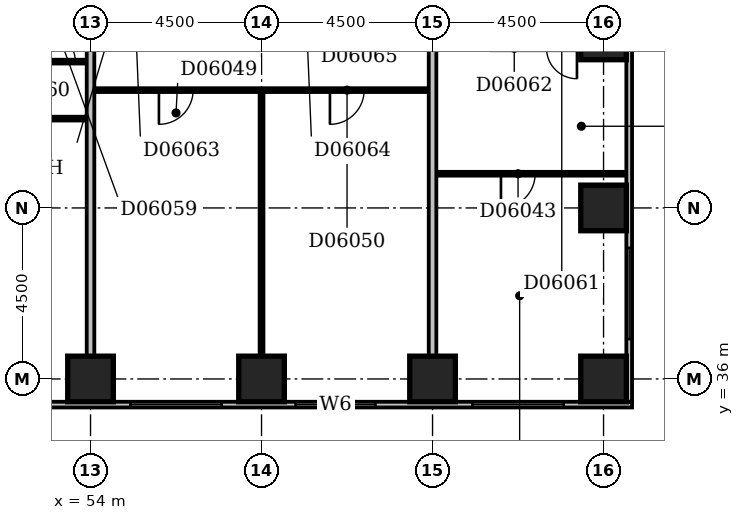
"""IFC4 building model, lengths in metres.
Left out: names, types, materials, properties, quantities, classifications, styles, units other than length and angle.
Written with IfcOpenShell. Run it as: python <this file> out.ifc"""

import sys

from ifc_helpers import new_model, si_unit, direction, frame, frame_2d, origin, origin_2d, place, context, subcontext, project, spatial, rectangle, extrude, element, fill, save


model = new_model("IFC4")
c1 = context("Model", 3, precision=1e-05, world=origin(), true_north=direction((0.0, 1.0)))
c2 = subcontext(c1, "Body", "Model", "MODEL_VIEW")
j1 = project(units=[si_unit("LENGTHUNIT", "METRE"), si_unit("PLANEANGLEUNIT", "RADIAN")], contexts=[c1])
p1 = place(None, origin())
s1 = spatial("IfcSite", under=j1, at=p1, CompositionType="ELEMENT")
p2 = place(p1, origin())
s2 = spatial("IfcBuilding", under=s1, at=p2, CompositionType="ELEMENT")
p3 = place(p2, frame((0.0, 0.0, 32.6)))
s3 = spatial("IfcBuildingStorey", under=s2, at=p3, CompositionType="ELEMENT", Elevation=32.6)
for number, where, z_axis, x_axis in (
    (1, (54.0, 36.0, -0.3), (0.0, 0.0, 1.0), (1.0, 0.0, 0.0)),
    (2, (58.5, 36.0, -0.3), (0.0, 0.0, 1.0), (1.0, 0.0, 0.0)),
    (3, (63.0, 36.0, -0.3), (0.0, 0.0, 1.0), (1.0, 0.0, 0.0)),
    (4, (67.5, 36.0, -0.3), (0.0, 0.0, 1.0), (1.0, 0.0, 0.0)),
    (5, (67.5, 40.5, -0.3), (0.0, 0.0, 1.0), (1.0, 0.0, 0.0)),
    (6, (67.5, 45.0, -0.3), (0.0, 0.0, 1.0), (1.0, 0.0, 0.0)),
):
    element("IfcColumn", number, at=place(p3, frame(where, z_axis=z_axis, x_axis=x_axis)), inside=s3, PredefinedType="COLUMN", context=c2, shape_type="SweptSolid", body=[
        extrude(rectangle(XDim=1.2, YDim=1.2, at=origin_2d()), origin(), (0.0, 0.0, 1.0), 3.6),
    ])
p4 = place(p3, frame((23.1, 35.325, 0.0), z_axis=(0.0, 0.0, 1.0), x_axis=(1.0, 0.0, 0.0)))
e7 = element("IfcWall", 7, at=p4, inside=s3, PredefinedType="STANDARD", context=c2, shape_type="SweptSolid", body=[
    extrude(rectangle(XDim=45.15, YDim=0.15, at=frame_2d((22.575, 0.0))), origin(), (0.0, 0.0, 1.0), 2.7),
])
p5 = place(p4, frame((0.45, 0.0, 0.6)))
e8 = element("IfcOpeningElement", 8, at=p5, cuts=e7, PredefinedType="OPENING", context=c2, shape_type="SweptSolid", body=[
    extrude(rectangle(XDim=2.4, YDim=1.8, at=frame_2d((1.2, 0.9))), frame((0.0, 0.087, 0.0), z_axis=(0.0, -1.0, 0.0), x_axis=(1.0, 0.0, 0.0)), (0.0, 0.0, 1.0), 0.174),
])
p6 = place(p4, frame((4.95, 0.0, 0.6)))
e9 = element("IfcOpeningElement", 9, at=p6, cuts=e7, PredefinedType="OPENING", context=c2, shape_type="SweptSolid", body=[
    extrude(rectangle(XDim=2.4, YDim=1.8, at=frame_2d((1.2, 0.9))), frame((0.0, 0.087, 0.0), z_axis=(0.0, -1.0, 0.0), x_axis=(1.0, 0.0, 0.0)), (0.0, 0.0, 1.0), 0.174),
])
p7 = place(p4, frame((10.583, 0.0, 0.6)))
e10 = element("IfcOpeningElement", 10, at=p7, cuts=e7, PredefinedType="OPENING", context=c2, shape_type="SweptSolid", body=[
    extrude(rectangle(XDim=1.5, YDim=1.8, at=frame_2d((0.75, 0.9))), frame((0.0, 0.087, 0.0), z_axis=(0.0, -1.0, 0.0), x_axis=(1.0, 0.0, 0.0)), (0.0, 0.0, 1.0), 0.174),
])
p8 = place(p4, frame((13.83, 0.0, 0.6)))
e11 = element("IfcOpeningElement", 11, at=p8, cuts=e7, PredefinedType="OPENING", context=c2, shape_type="SweptSolid", body=[
    extrude(rectangle(XDim=1.5, YDim=1.8, at=frame_2d((0.75, 0.9))), frame((0.0, 0.087, 0.0), z_axis=(0.0, -1.0, 0.0), x_axis=(1.0, 0.0, 0.0)), (0.0, 0.0, 1.0), 0.174),
])
p9 = place(p4, frame((18.45, 0.0, 0.6)))
e12 = element("IfcOpeningElement", 12, at=p9, cuts=e7, PredefinedType="OPENING", context=c2, shape_type="SweptSolid", body=[
    extrude(rectangle(XDim=2.4, YDim=1.8, at=frame_2d((1.2, 0.9))), frame((0.0, 0.087, 0.0), z_axis=(0.0, -1.0, 0.0), x_axis=(1.0, 0.0, 0.0)), (0.0, 0.0, 1.0), 0.174),
])
p10 = place(p4, frame((22.95, 0.0, 0.6)))
e13 = element("IfcOpeningElement", 13, at=p10, cuts=e7, PredefinedType="OPENING", context=c2, shape_type="SweptSolid", body=[
    extrude(rectangle(XDim=2.4, YDim=1.8, at=frame_2d((1.2, 0.9))), frame((0.0, 0.087, 0.0), z_axis=(0.0, -1.0, 0.0), x_axis=(1.0, 0.0, 0.0)), (0.0, 0.0, 1.0), 0.174),
])
p11 = place(p4, frame((27.45, 0.0, 0.6)))
e14 = element("IfcOpeningElement", 14, at=p11, cuts=e7, PredefinedType="OPENING", context=c2, shape_type="SweptSolid", body=[
    extrude(rectangle(XDim=2.4, YDim=1.8, at=frame_2d((1.2, 0.9))), frame((0.0, 0.087, 0.0), z_axis=(0.0, -1.0, 0.0), x_axis=(1.0, 0.0, 0.0)), (0.0, 0.0, 1.0), 0.174),
])
p12 = place(p4, frame((31.95, 0.0, 0.6)))
e15 = element("IfcOpeningElement", 15, at=p12, cuts=e7, PredefinedType="OPENING", context=c2, shape_type="SweptSolid", body=[
    extrude(rectangle(XDim=2.4, YDim=1.8, at=frame_2d((1.2, 0.9))), frame((0.0, 0.087, 0.0), z_axis=(0.0, -1.0, 0.0), x_axis=(1.0, 0.0, 0.0)), (0.0, 0.0, 1.0), 0.174),
])
p13 = place(p4, frame((36.297, 0.0, 0.6)))
e16 = element("IfcOpeningElement", 16, at=p13, cuts=e7, PredefinedType="OPENING", context=c2, shape_type="SweptSolid", body=[
    extrude(rectangle(XDim=2.1, YDim=1.8, at=frame_2d((1.05, 0.9))), frame((0.0, 0.087, 0.0), z_axis=(0.0, -1.0, 0.0), x_axis=(1.0, 0.0, 0.0)), (0.0, 0.0, 1.0), 0.174),
])
p14 = place(p4, frame((40.95, 0.0, 0.6)))
e17 = element("IfcOpeningElement", 17, at=p14, cuts=e7, PredefinedType="OPENING", context=c2, shape_type="SweptSolid", body=[
    extrude(rectangle(XDim=2.4, YDim=1.8, at=frame_2d((1.2, 0.9))), frame((0.0, 0.087, 0.0), z_axis=(0.0, -1.0, 0.0), x_axis=(1.0, 0.0, 0.0)), (0.0, 0.0, 1.0), 0.174),
])
p15 = place(p3, frame((68.175, 35.4, 0.0), z_axis=(0.0, 0.0, 1.0), x_axis=(0.0, 1.0, 0.0)))
e18 = element("IfcWall", 18, at=p15, inside=s3, PredefinedType="STANDARD", context=c2, shape_type="SweptSolid", body=[
    extrude(rectangle(XDim=23.85, YDim=0.15, at=frame_2d((11.925, 0.0))), origin(), (0.0, 0.0, 1.0), 2.7),
])
p16 = place(p15, frame((1.65, 0.0, 0.6)))
e19 = element("IfcOpeningElement", 19, at=p16, cuts=e18, PredefinedType="OPENING", context=c2, shape_type="SweptSolid", body=[
    extrude(rectangle(XDim=2.4, YDim=1.8, at=frame_2d((1.2, 0.9))), frame((0.0, 0.087, 0.0), z_axis=(0.0, -1.0, 0.0), x_axis=(1.0, 0.0, 0.0)), (0.0, 0.0, 1.0), 0.174),
])
p17 = place(p15, frame((19.65, 0.0, 0.6)))
e20 = element("IfcOpeningElement", 20, at=p17, cuts=e18, PredefinedType="OPENING", context=c2, shape_type="SweptSolid", body=[
    extrude(rectangle(XDim=2.4, YDim=1.8, at=frame_2d((1.2, 0.9))), frame((0.0, 0.087, 0.0), z_axis=(0.0, -1.0, 0.0), x_axis=(1.0, 0.0, 0.0)), (0.0, 0.0, 1.0), 0.174),
])
p18 = place(p3, frame((54.0, 36.6, 0.0), z_axis=(0.0, 0.0, 1.0), x_axis=(0.0, 1.0, 0.0)))
e21 = element("IfcWall", 21, at=p18, inside=s3, PredefinedType="PARTITIONING", context=c2, shape_type="SweptSolid", body=[
    extrude(rectangle(XDim=12.8, YDim=0.2, at=frame_2d((6.4, 0.0))), origin(), (0.0, 0.0, 1.0), 2.6),
])
p19 = place(p3, frame((58.5, 36.6, 0.0), z_axis=(0.0, 0.0, 1.0), x_axis=(0.0, 1.0, 0.0)))
e22 = element("IfcWall", 22, at=p19, inside=s3, PredefinedType="PARTITIONING", context=c2, shape_type="SweptSolid", body=[
    extrude(rectangle(XDim=6.95, YDim=0.1, at=frame_2d((3.475, 0.0))), origin(), (0.0, 0.0, 1.0), 3.3),
])
p20 = place(p3, frame((63.0, 36.6, 0.0), z_axis=(0.0, 0.0, 1.0), x_axis=(0.0, 1.0, 0.0)))
e23 = element("IfcWall", 23, at=p20, inside=s3, PredefinedType="PARTITIONING", context=c2, shape_type="SweptSolid", body=[
    extrude(rectangle(XDim=12.8, YDim=0.2, at=frame_2d((6.4, 0.0))), origin(), (0.0, 0.0, 1.0), 2.4),
])
p21 = place(p3, frame((63.1, 41.4, 0.0), z_axis=(0.0, 0.0, 1.0), x_axis=(1.0, 0.0, 0.0)))
e24 = element("IfcWall", 24, at=p21, inside=s3, PredefinedType="PARTITIONING", context=c2, shape_type="SweptSolid", body=[
    extrude(rectangle(XDim=5.0, YDim=0.1, at=frame_2d((2.5, 0.0))), origin(), (0.0, 0.0, 1.0), 3.3),
])
p22 = place(p21, frame((1.7, 0.0, 0.0)))
e25 = element("IfcOpeningElement", 25, at=p22, cuts=e24, PredefinedType="OPENING", context=c2, shape_type="SweptSolid", body=[
    extrude(rectangle(XDim=0.9, YDim=2.1, at=frame_2d((0.45, 1.05))), frame((0.0, 0.062, 0.0), z_axis=(0.0, -1.0, 0.0), x_axis=(1.0, 0.0, 0.0)), (0.0, 0.0, 1.0), 0.124),
])
p23 = place(p3, frame((40.6, 42.85, 0.0), z_axis=(0.0, 0.0, 1.0), x_axis=(1.0, 0.0, 0.0)))
e26 = element("IfcWall", 26, at=p23, inside=s3, PredefinedType="PARTITIONING", context=c2, shape_type="SweptSolid", body=[
    extrude(rectangle(XDim=13.3, YDim=0.1, at=frame_2d((6.65, 0.0))), origin(), (0.0, 0.0, 1.0), 3.3),
])
p24 = place(p23, frame((3.9, 0.0, 0.0)))
e27 = element("IfcOpeningElement", 27, at=p24, cuts=e26, PredefinedType="OPENING", context=c2, shape_type="SweptSolid", body=[
    extrude(rectangle(XDim=0.9, YDim=2.1, at=frame_2d((0.45, 1.05))), frame((0.0, 0.062, 0.0), z_axis=(0.0, -1.0, 0.0), x_axis=(1.0, 0.0, 0.0)), (0.0, 0.0, 1.0), 0.124),
])
p25 = place(p23, frame((10.7, 0.0, 0.0)))
e28 = element("IfcOpeningElement", 28, at=p25, cuts=e26, PredefinedType="OPENING", context=c2, shape_type="SweptSolid", body=[
    extrude(rectangle(XDim=0.9, YDim=2.1, at=frame_2d((0.45, 1.05))), frame((0.0, 0.062, 0.0), z_axis=(0.0, -1.0, 0.0), x_axis=(1.0, 0.0, 0.0)), (0.0, 0.0, 1.0), 0.124),
])
p26 = place(p3, frame((54.1, 43.6, 0.0), z_axis=(0.0, 0.0, 1.0), x_axis=(1.0, 0.0, 0.0)))
e29 = element("IfcWall", 29, at=p26, inside=s3, PredefinedType="PARTITIONING", context=c2, shape_type="SweptSolid", body=[
    extrude(rectangle(XDim=8.8, YDim=0.1, at=frame_2d((4.4, 0.0))), origin(), (0.0, 0.0, 1.0), 3.3),
])
p27 = place(p26, frame((1.7, 0.0, 0.0)))
e30 = element("IfcOpeningElement", 30, at=p27, cuts=e29, PredefinedType="OPENING", context=c2, shape_type="SweptSolid", body=[
    extrude(rectangle(XDim=0.9, YDim=2.1, at=frame_2d((0.45, 1.05))), frame((0.0, 0.062, 0.0), z_axis=(0.0, -1.0, 0.0), x_axis=(1.0, 0.0, 0.0)), (0.0, 0.0, 1.0), 0.124),
])
p28 = place(p26, frame((6.2, 0.0, 0.0)))
e31 = element("IfcOpeningElement", 31, at=p28, cuts=e29, PredefinedType="OPENING", context=c2, shape_type="SweptSolid", body=[
    extrude(rectangle(XDim=0.9, YDim=2.1, at=frame_2d((0.45, 1.05))), frame((0.0, 0.062, 0.0), z_axis=(0.0, -1.0, 0.0), x_axis=(1.0, 0.0, 0.0)), (0.0, 0.0, 1.0), 0.124),
])
p29 = place(p3, frame((42.15, 44.35, 0.0), z_axis=(0.0, 0.0, 1.0), x_axis=(1.0, 0.0, 0.0)))
e32 = element("IfcWall", 32, at=p29, inside=s3, PredefinedType="PARTITIONING", context=c2, shape_type="SweptSolid", body=[
    extrude(rectangle(XDim=11.75, YDim=0.1, at=frame_2d((5.875, 0.0))), origin(), (0.0, 0.0, 1.0), 3.3),
])
p30 = place(p29, frame((7.15, 0.0, 0.0)))
e33 = element("IfcOpeningElement", 33, at=p30, cuts=e32, PredefinedType="OPENING", context=c2, shape_type="SweptSolid", body=[
    extrude(rectangle(XDim=0.8, YDim=2.1, at=frame_2d((0.4, 1.05))), frame((0.0, 0.062, 0.0), z_axis=(0.0, -1.0, 0.0), x_axis=(1.0, 0.0, 0.0)), (0.0, 0.0, 1.0), 0.124),
])
p31 = place(p29, frame((2.7, 0.0, 0.0)))
e34 = element("IfcOpeningElement", 34, at=p31, cuts=e32, PredefinedType="OPENING", context=c2, shape_type="SweptSolid", body=[
    extrude(rectangle(XDim=0.9, YDim=2.1, at=frame_2d((0.45, 1.05))), frame((0.0, 0.062, 0.0), z_axis=(0.0, -1.0, 0.0), x_axis=(1.0, 0.0, 0.0)), (0.0, 0.0, 1.0), 0.124),
])
p32 = place(p29, frame((10.65, 0.0, 0.0)))
e35 = element("IfcOpeningElement", 35, at=p32, cuts=e32, PredefinedType="OPENING", context=c2, shape_type="SweptSolid", body=[
    extrude(rectangle(XDim=0.8, YDim=2.1, at=frame_2d((0.4, 1.05))), frame((0.0, 0.062, 0.0), z_axis=(0.0, -1.0, 0.0), x_axis=(1.0, 0.0, 0.0)), (0.0, 0.0, 1.0), 0.124),
])
p33 = place(p29, frame((9.1, 0.0, 0.0)))
e36 = element("IfcOpeningElement", 36, at=p33, cuts=e32, PredefinedType="OPENING", context=c2, shape_type="SweptSolid", body=[
    extrude(rectangle(XDim=0.8, YDim=2.1, at=frame_2d((0.4, 1.05))), frame((0.0, 0.062, 0.0), z_axis=(0.0, -1.0, 0.0), x_axis=(1.0, 0.0, 0.0)), (0.0, 0.0, 1.0), 0.124),
])
p34 = place(p12, origin())
e37 = element("IfcWindow", 37, at=p34, inside=s3, PartitioningType="SINGLE_PANEL", PredefinedType="WINDOW", context=c2, shape_type="SweptSolid", body=[
    extrude(rectangle(XDim=2.4, YDim=1.8, at=frame_2d((1.2, 0.9))), frame((0.0, 0.03, 0.0), z_axis=(0.0, -1.0, 0.0), x_axis=(1.0, 0.0, 0.0)), (0.0, 0.0, 1.0), 0.06),
])
fill(e15, e37)
p35 = place(p13, origin())
e38 = element("IfcWindow", 38, at=p35, inside=s3, PartitioningType="SINGLE_PANEL", PredefinedType="WINDOW", context=c2, shape_type="SweptSolid", body=[
    extrude(rectangle(XDim=2.1, YDim=1.8, at=frame_2d((1.05, 0.9))), frame((0.0, 0.03, 0.0), z_axis=(0.0, -1.0, 0.0), x_axis=(1.0, 0.0, 0.0)), (0.0, 0.0, 1.0), 0.06),
])
fill(e16, e38)
p36 = place(p14, origin())
e39 = element("IfcWindow", 39, at=p36, inside=s3, PartitioningType="SINGLE_PANEL", PredefinedType="WINDOW", context=c2, shape_type="SweptSolid", body=[
    extrude(rectangle(XDim=2.4, YDim=1.8, at=frame_2d((1.2, 0.9))), frame((0.0, 0.03, 0.0), z_axis=(0.0, -1.0, 0.0), x_axis=(1.0, 0.0, 0.0)), (0.0, 0.0, 1.0), 0.06),
])
fill(e17, e39)
p37 = place(p16, origin())
e40 = element("IfcWindow", 40, at=p37, inside=s3, PartitioningType="SINGLE_PANEL", PredefinedType="WINDOW", context=c2, shape_type="SweptSolid", body=[
    extrude(rectangle(XDim=2.4, YDim=1.8, at=frame_2d((1.2, 0.9))), frame((0.0, 0.03, 0.0), z_axis=(0.0, -1.0, 0.0), x_axis=(1.0, 0.0, 0.0)), (0.0, 0.0, 1.0), 0.06),
])
fill(e19, e40)
p38 = place(p22, frame((0.9, 0.0, 0.0), z_axis=(0.0, 0.0, 1.0), x_axis=(-1.0, 0.0, 0.0)))
e41 = element("IfcDoor", 41, at=p38, inside=s3, OperationType="SINGLE_SWING_RIGHT", PredefinedType="DOOR", context=c2, shape_type="SweptSolid", body=[
    extrude(rectangle(XDim=0.9, YDim=2.1, at=frame_2d((0.45, 1.05))), frame((0.0, 0.025, 0.0), z_axis=(0.0, -1.0, 0.0), x_axis=(1.0, 0.0, 0.0)), (0.0, 0.0, 1.0), 0.05),
])
fill(e25, e41)
p39 = place(p27, frame((0.9, 0.0, 0.0), z_axis=(0.0, 0.0, 1.0), x_axis=(-1.0, 0.0, 0.0)))
e42 = element("IfcDoor", 42, at=p39, inside=s3, OperationType="SINGLE_SWING_RIGHT", PredefinedType="DOOR", context=c2, shape_type="SweptSolid", body=[
    extrude(rectangle(XDim=0.9, YDim=2.1, at=frame_2d((0.45, 1.05))), frame((0.0, 0.025, 0.0), z_axis=(0.0, -1.0, 0.0), x_axis=(1.0, 0.0, 0.0)), (0.0, 0.0, 1.0), 0.05),
])
fill(e30, e42)
p40 = place(p28, frame((0.9, 0.0, 0.0), z_axis=(0.0, 0.0, 1.0), x_axis=(-1.0, 0.0, 0.0)))
e43 = element("IfcDoor", 43, at=p40, inside=s3, OperationType="SINGLE_SWING_RIGHT", PredefinedType="DOOR", context=c2, shape_type="SweptSolid", body=[
    extrude(rectangle(XDim=0.9, YDim=2.1, at=frame_2d((0.45, 1.05))), frame((0.0, 0.025, 0.0), z_axis=(0.0, -1.0, 0.0), x_axis=(1.0, 0.0, 0.0)), (0.0, 0.0, 1.0), 0.05),
])
fill(e31, e43)
p41 = place(p32, origin())
e44 = element("IfcDoor", 44, at=p41, inside=s3, OperationType="SINGLE_SWING_LEFT", PredefinedType="DOOR", context=c2, shape_type="SweptSolid", body=[
    extrude(rectangle(XDim=0.8, YDim=2.1, at=frame_2d((0.4, 1.05))), frame((0.0, 0.025, 0.0), z_axis=(0.0, -1.0, 0.0), x_axis=(1.0, 0.0, 0.0)), (0.0, 0.0, 1.0), 0.05),
])
fill(e35, e44)
save(model, sys.argv[1])
